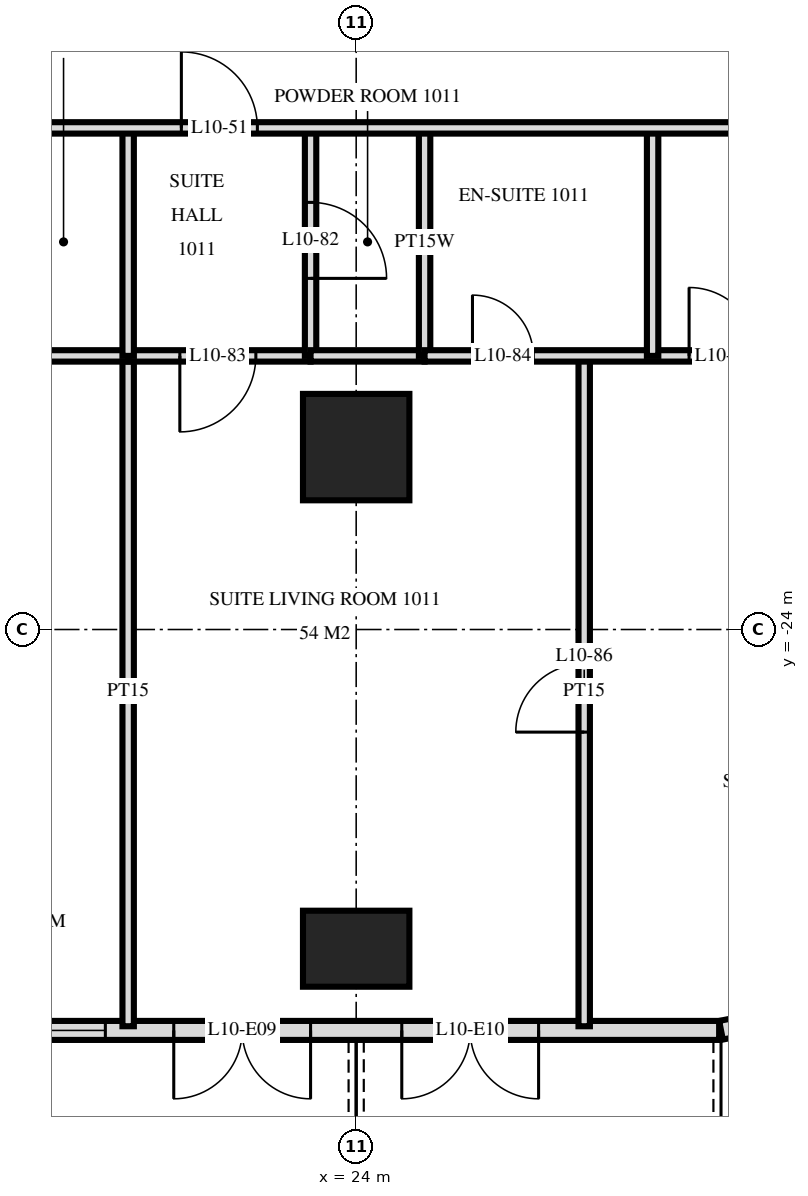
"""IFC4 building model, lengths in metres.
Left out: names, types, materials, properties, quantities, classifications, styles, units other than length and angle.
Written with IfcOpenShell. Run it as: python <this file> out.ifc"""

import sys

from ifc_helpers import new_model, si_unit, direction, frame, frame_2d, origin, origin_2d, place, context, subcontext, project, spatial, rectangle, extrude, element, fill, save


model = new_model("IFC4")
c1 = context("Model", 3, precision=1e-05, world=origin(), true_north=direction((0.0, 1.0)))
c2 = subcontext(c1, "Body", "Model", "MODEL_VIEW")
j1 = project(units=[si_unit("LENGTHUNIT", "METRE"), si_unit("PLANEANGLEUNIT", "RADIAN")], contexts=[c1])
p1 = place(None, origin())
s1 = spatial("IfcSite", under=j1, at=p1, CompositionType="ELEMENT")
p2 = place(p1, origin())
s2 = spatial("IfcBuilding", under=s1, at=p2, CompositionType="ELEMENT")
p3 = place(p2, frame((0.0, 0.0, 45.6)))
s3 = spatial("IfcBuildingStorey", under=s2, at=p3, CompositionType="ELEMENT", Elevation=45.6)
p4 = place(p3, frame((24.0, -28.2, 0.0), z_axis=(0.0, 0.0, 1.0), x_axis=(1.0, 0.0, 0.0)))
e1 = element("IfcColumn", 1, at=p4, inside=s3, PredefinedType="COLUMN", context=c2, shape_type="SweptSolid", body=[
    extrude(rectangle(XDim=1.4, YDim=1.0, at=origin_2d()), origin(), (0.0, 0.0, 1.0), 3.6),
])
p5 = place(p3, frame((24.0, -21.6, 0.0), z_axis=(0.0, 0.0, 1.0), x_axis=(1.0, 0.0, 0.0)))
e2 = element("IfcColumn", 2, at=p5, inside=s3, PredefinedType="COLUMN", context=c2, shape_type="SweptSolid", body=[
    extrude(rectangle(XDim=1.4, YDim=1.4, at=origin_2d()), origin(), (0.0, 0.0, 1.0), 3.6),
])
p6 = place(p3, frame((-28.775, -29.275, 0.0), z_axis=(0.0, 0.0, 1.0), x_axis=(1.0, 0.0, 0.0)))
e3 = element("IfcWall", 3, at=p6, inside=s3, PredefinedType="SOLIDWALL", context=c2, shape_type="SweptSolid", body=[
    extrude(rectangle(XDim=57.551, YDim=0.25, at=frame_2d((28.775, 0.0))), origin(), (0.0, 0.0, 1.0), 3.32),
])
p7 = place(p6, frame((0.575, 0.0, 0.0)))
e4 = element("IfcOpeningElement", 4, at=p7, cuts=e3, PredefinedType="OPENING", context=c2, shape_type="SweptSolid", body=[
    extrude(rectangle(XDim=1.8, YDim=2.4, at=frame_2d((0.9, 1.2))), frame((0.0, 0.135, 0.0), z_axis=(0.0, -1.0, 0.0), x_axis=(1.0, 0.0, 0.0)), (0.0, 0.0, 1.0), 0.27),
])
p8 = place(p6, frame((5.375, 0.0, 0.0)))
e5 = element("IfcOpeningElement", 5, at=p8, cuts=e3, PredefinedType="OPENING", context=c2, shape_type="SweptSolid", body=[
    extrude(rectangle(XDim=1.8, YDim=2.4, at=frame_2d((0.9, 1.2))), frame((0.0, 0.135, 0.0), z_axis=(0.0, -1.0, 0.0), x_axis=(1.0, 0.0, 0.0)), (0.0, 0.0, 1.0), 0.27),
])
p9 = place(p6, frame((8.075, 0.0, 0.3)))
e6 = element("IfcOpeningElement", 6, at=p9, cuts=e3, PredefinedType="OPENING", context=c2, shape_type="SweptSolid", body=[
    extrude(rectangle(XDim=2.4, YDim=2.1, at=frame_2d((1.2, 1.05))), frame((0.0, 0.135, 0.0), z_axis=(0.0, -1.0, 0.0), x_axis=(1.0, 0.0, 0.0)), (0.0, 0.0, 1.0), 0.27),
])
p10 = place(p6, frame((12.875, 0.0, 0.0)))
e7 = element("IfcOpeningElement", 7, at=p10, cuts=e3, PredefinedType="OPENING", context=c2, shape_type="SweptSolid", body=[
    extrude(rectangle(XDim=1.8, YDim=2.4, at=frame_2d((0.9, 1.2))), frame((0.0, 0.135, 0.0), z_axis=(0.0, -1.0, 0.0), x_axis=(1.0, 0.0, 0.0)), (0.0, 0.0, 1.0), 0.27),
])
p11 = place(p6, frame((17.375, 0.0, 0.0)))
e8 = element("IfcOpeningElement", 8, at=p11, cuts=e3, PredefinedType="OPENING", context=c2, shape_type="SweptSolid", body=[
    extrude(rectangle(XDim=1.8, YDim=2.4, at=frame_2d((0.9, 1.2))), frame((0.0, 0.135, 0.0), z_axis=(0.0, -1.0, 0.0), x_axis=(1.0, 0.0, 0.0)), (0.0, 0.0, 1.0), 0.27),
])
p12 = place(p6, frame((20.075, 0.0, 0.3)))
e9 = element("IfcOpeningElement", 9, at=p12, cuts=e3, PredefinedType="OPENING", context=c2, shape_type="SweptSolid", body=[
    extrude(rectangle(XDim=2.4, YDim=2.1, at=frame_2d((1.2, 1.05))), frame((0.0, 0.135, 0.0), z_axis=(0.0, -1.0, 0.0), x_axis=(1.0, 0.0, 0.0)), (0.0, 0.0, 1.0), 0.27),
])
p13 = place(p6, frame((23.075, 0.0, 0.3)))
e10 = element("IfcOpeningElement", 10, at=p13, cuts=e3, PredefinedType="OPENING", context=c2, shape_type="SweptSolid", body=[
    extrude(rectangle(XDim=2.4, YDim=2.1, at=frame_2d((1.2, 1.05))), frame((0.0, 0.135, 0.0), z_axis=(0.0, -1.0, 0.0), x_axis=(1.0, 0.0, 0.0)), (0.0, 0.0, 1.0), 0.27),
])
p14 = place(p6, frame((26.375, 0.0, 0.0)))
e11 = element("IfcOpeningElement", 11, at=p14, cuts=e3, PredefinedType="OPENING", context=c2, shape_type="SweptSolid", body=[
    extrude(rectangle(XDim=1.8, YDim=2.4, at=frame_2d((0.9, 1.2))), frame((0.0, 0.135, 0.0), z_axis=(0.0, -1.0, 0.0), x_axis=(1.0, 0.0, 0.0)), (0.0, 0.0, 1.0), 0.27),
])
p15 = place(p6, frame((29.075, 0.0, 0.3)))
e12 = element("IfcOpeningElement", 12, at=p15, cuts=e3, PredefinedType="OPENING", context=c2, shape_type="SweptSolid", body=[
    extrude(rectangle(XDim=2.4, YDim=2.1, at=frame_2d((1.2, 1.05))), frame((0.0, 0.135, 0.0), z_axis=(0.0, -1.0, 0.0), x_axis=(1.0, 0.0, 0.0)), (0.0, 0.0, 1.0), 0.27),
])
p16 = place(p6, frame((32.375, 0.0, 0.0)))
e13 = element("IfcOpeningElement", 13, at=p16, cuts=e3, PredefinedType="OPENING", context=c2, shape_type="SweptSolid", body=[
    extrude(rectangle(XDim=1.8, YDim=2.4, at=frame_2d((0.9, 1.2))), frame((0.0, 0.135, 0.0), z_axis=(0.0, -1.0, 0.0), x_axis=(1.0, 0.0, 0.0)), (0.0, 0.0, 1.0), 0.27),
])
p17 = place(p6, frame((35.375, 0.0, 0.0)))
e14 = element("IfcOpeningElement", 14, at=p17, cuts=e3, PredefinedType="OPENING", context=c2, shape_type="SweptSolid", body=[
    extrude(rectangle(XDim=1.8, YDim=2.4, at=frame_2d((0.9, 1.2))), frame((0.0, 0.135, 0.0), z_axis=(0.0, -1.0, 0.0), x_axis=(1.0, 0.0, 0.0)), (0.0, 0.0, 1.0), 0.27),
])
p18 = place(p6, frame((38.075, 0.0, 0.3)))
e15 = element("IfcOpeningElement", 15, at=p18, cuts=e3, PredefinedType="OPENING", context=c2, shape_type="SweptSolid", body=[
    extrude(rectangle(XDim=2.4, YDim=2.1, at=frame_2d((1.2, 1.05))), frame((0.0, 0.135, 0.0), z_axis=(0.0, -1.0, 0.0), x_axis=(1.0, 0.0, 0.0)), (0.0, 0.0, 1.0), 0.27),
])
p19 = place(p6, frame((41.075, 0.0, 0.3)))
e16 = element("IfcOpeningElement", 16, at=p19, cuts=e3, PredefinedType="OPENING", context=c2, shape_type="SweptSolid", body=[
    extrude(rectangle(XDim=2.4, YDim=2.1, at=frame_2d((1.2, 1.05))), frame((0.0, 0.135, 0.0), z_axis=(0.0, -1.0, 0.0), x_axis=(1.0, 0.0, 0.0)), (0.0, 0.0, 1.0), 0.27),
])
p20 = place(p6, frame((44.375, 0.0, 0.0)))
e17 = element("IfcOpeningElement", 17, at=p20, cuts=e3, PredefinedType="OPENING", context=c2, shape_type="SweptSolid", body=[
    extrude(rectangle(XDim=1.8, YDim=2.4, at=frame_2d((0.9, 1.2))), frame((0.0, 0.135, 0.0), z_axis=(0.0, -1.0, 0.0), x_axis=(1.0, 0.0, 0.0)), (0.0, 0.0, 1.0), 0.27),
])
p21 = place(p6, frame((47.075, 0.0, 0.3)))
e18 = element("IfcOpeningElement", 18, at=p21, cuts=e3, PredefinedType="OPENING", context=c2, shape_type="SweptSolid", body=[
    extrude(rectangle(XDim=2.4, YDim=2.1, at=frame_2d((1.2, 1.05))), frame((0.0, 0.135, 0.0), z_axis=(0.0, -1.0, 0.0), x_axis=(1.0, 0.0, 0.0)), (0.0, 0.0, 1.0), 0.27),
])
p22 = place(p6, frame((50.375, 0.0, 0.0)))
e19 = element("IfcOpeningElement", 19, at=p22, cuts=e3, PredefinedType="OPENING", context=c2, shape_type="SweptSolid", body=[
    extrude(rectangle(XDim=1.8, YDim=2.4, at=frame_2d((0.9, 1.2))), frame((0.0, 0.135, 0.0), z_axis=(0.0, -1.0, 0.0), x_axis=(1.0, 0.0, 0.0)), (0.0, 0.0, 1.0), 0.27),
])
p23 = place(p6, frame((53.375, 0.0, 0.0)))
e20 = element("IfcOpeningElement", 20, at=p23, cuts=e3, PredefinedType="OPENING", context=c2, shape_type="SweptSolid", body=[
    extrude(rectangle(XDim=1.8, YDim=2.4, at=frame_2d((0.9, 1.2))), frame((0.0, 0.135, 0.0), z_axis=(0.0, -1.0, 0.0), x_axis=(1.0, 0.0, 0.0)), (0.0, 0.0, 1.0), 0.27),
])
p24 = place(p3, frame((28.8, -29.273, 0.0), z_axis=(0.0, 0.0, 1.0), x_axis=(0.980775640221, 0.19513878023, 0.0)))
e21 = element("IfcWall", 21, at=p24, inside=s3, PredefinedType="SOLIDWALL", context=c2, shape_type="SweptSolid", body=[
    extrude(rectangle(XDim=1.681, YDim=0.25, at=frame_2d((0.841, 0.0))), origin(), (0.0, 0.0, 1.0), 3.32),
])
p25 = place(p3, frame((27.9, -20.4, 0.0), z_axis=(0.0, 0.0, 1.0), x_axis=(0.0, 1.0, 0.0)))
e22 = element("IfcWall", 22, at=p25, inside=s3, PredefinedType="PARTITIONING", context=c2, shape_type="SweptSolid", body=[
    extrude(rectangle(XDim=3.0, YDim=0.15, at=frame_2d((1.5, 0.0))), origin(), (0.0, 0.0, 1.0), 3.32),
])
p26 = place(p3, frame((27.0, -29.22, 0.0), z_axis=(0.0, 0.0, 1.0), x_axis=(0.0, 1.0, 0.0)))
e23 = element("IfcWall", 23, at=p26, inside=s3, PredefinedType="PARTITIONING", context=c2, shape_type="SweptSolid", body=[
    extrude(rectangle(XDim=8.82, YDim=0.15, at=frame_2d((4.41, 0.0))), origin(), (0.0, 0.0, 1.0), 3.32),
])
p27 = place(p26, frame((3.87, 0.0, 0.0)))
e24 = element("IfcOpeningElement", 24, at=p27, cuts=e23, PredefinedType="OPENING", context=c2, shape_type="SweptSolid", body=[
    extrude(rectangle(XDim=0.9, YDim=2.1, at=frame_2d((0.45, 1.05))), frame((0.0, 0.085, 0.0), z_axis=(0.0, -1.0, 0.0), x_axis=(1.0, 0.0, 0.0)), (0.0, 0.0, 1.0), 0.17),
])
p28 = place(p3, frame((24.9, -20.4, 0.0), z_axis=(0.0, 0.0, 1.0), x_axis=(0.0, 1.0, 0.0)))
e25 = element("IfcWall", 25, at=p28, inside=s3, PredefinedType="PLUMBINGWALL", context=c2, shape_type="SweptSolid", body=[
    extrude(rectangle(XDim=3.0, YDim=0.15, at=frame_2d((1.5, 0.0))), origin(), (0.0, 0.0, 1.0), 3.32),
])
p29 = place(p3, frame((23.4, -20.4, 0.0), z_axis=(0.0, 0.0, 1.0), x_axis=(0.0, 1.0, 0.0)))
e26 = element("IfcWall", 26, at=p29, inside=s3, PredefinedType="PARTITIONING", context=c2, shape_type="SweptSolid", body=[
    extrude(rectangle(XDim=3.0, YDim=0.15, at=frame_2d((1.5, 0.0))), origin(), (0.0, 0.0, 1.0), 3.32),
])
p30 = place(p29, frame((1.02, 0.0, 0.0)))
e27 = element("IfcOpeningElement", 27, at=p30, cuts=e26, PredefinedType="OPENING", context=c2, shape_type="SweptSolid", body=[
    extrude(rectangle(XDim=1.0, YDim=2.1, at=frame_2d((0.5, 1.05))), frame((0.0, 0.085, 0.0), z_axis=(0.0, -1.0, 0.0), x_axis=(1.0, 0.0, 0.0)), (0.0, 0.0, 1.0), 0.17),
])
p31 = place(p3, frame((21.0, -20.4, 0.0), z_axis=(0.0, 0.0, 1.0), x_axis=(0.0, 1.0, 0.0)))
e28 = element("IfcWall", 28, at=p31, inside=s3, PredefinedType="PARTITIONING", context=c2, shape_type="SweptSolid", body=[
    extrude(rectangle(XDim=3.0, YDim=0.15, at=frame_2d((1.5, 0.0))), origin(), (0.0, 0.0, 1.0), 3.32),
])
p32 = place(p3, frame((21.0, -29.22, 0.0), z_axis=(0.0, 0.0, 1.0), x_axis=(0.0, 1.0, 0.0)))
e29 = element("IfcWall", 29, at=p32, inside=s3, PredefinedType="PARTITIONING", context=c2, shape_type="SweptSolid", body=[
    extrude(rectangle(XDim=8.82, YDim=0.15, at=frame_2d((4.41, 0.0))), origin(), (0.0, 0.0, 1.0), 3.32),
])
p33 = place(p3, frame((21.0, -20.4, 0.0), z_axis=(0.0, 0.0, 1.0), x_axis=(1.0, 0.0, 0.0)))
e30 = element("IfcWall", 30, at=p33, inside=s3, PredefinedType="PARTITIONING", context=c2, shape_type="SweptSolid", body=[
    extrude(rectangle(XDim=2.4, YDim=0.15, at=frame_2d((1.2, 0.0))), origin(), (0.0, 0.0, 1.0), 3.32),
])
p34 = place(p33, frame((0.68, 0.0, 0.0)))
e31 = element("IfcOpeningElement", 31, at=p34, cuts=e30, PredefinedType="OPENING", context=c2, shape_type="SweptSolid", body=[
    extrude(rectangle(XDim=1.0, YDim=2.1, at=frame_2d((0.5, 1.05))), frame((0.0, 0.085, 0.0), z_axis=(0.0, -1.0, 0.0), x_axis=(1.0, 0.0, 0.0)), (0.0, 0.0, 1.0), 0.17),
])
p35 = place(p3, frame((19.3, -20.4, 0.0), z_axis=(0.0, 0.0, 1.0), x_axis=(1.0, 0.0, 0.0)))
e32 = element("IfcWall", 32, at=p35, inside=s3, PredefinedType="PARTITIONING", context=c2, shape_type="SweptSolid", body=[
    extrude(rectangle(XDim=1.7, YDim=0.15, at=frame_2d((0.85, 0.0))), origin(), (0.0, 0.0, 1.0), 3.32),
])
p36 = place(p3, frame((24.9, -20.4, 0.0), z_axis=(0.0, 0.0, 1.0), x_axis=(1.0, 0.0, 0.0)))
e33 = element("IfcWall", 33, at=p36, inside=s3, PredefinedType="PARTITIONING", context=c2, shape_type="SweptSolid", body=[
    extrude(rectangle(XDim=8.22, YDim=0.15, at=frame_2d((4.11, 0.0))), origin(), (0.0, 0.0, 1.0), 3.32),
])
p37 = place(p36, frame((0.63, 0.0, 0.0)))
e34 = element("IfcOpeningElement", 34, at=p37, cuts=e33, PredefinedType="OPENING", context=c2, shape_type="SweptSolid", body=[
    extrude(rectangle(XDim=0.8, YDim=2.1, at=frame_2d((0.4, 1.05))), frame((0.0, 0.085, 0.0), z_axis=(0.0, -1.0, 0.0), x_axis=(1.0, 0.0, 0.0)), (0.0, 0.0, 1.0), 0.17),
])
p38 = place(p36, frame((3.48, 0.0, 0.0)))
e35 = element("IfcOpeningElement", 35, at=p38, cuts=e33, PredefinedType="OPENING", context=c2, shape_type="SweptSolid", body=[
    extrude(rectangle(XDim=0.9, YDim=2.1, at=frame_2d((0.45, 1.05))), frame((0.0, 0.085, 0.0), z_axis=(0.0, -1.0, 0.0), x_axis=(1.0, 0.0, 0.0)), (0.0, 0.0, 1.0), 0.17),
])
p39 = place(p3, frame((23.4, -20.4, 0.0), z_axis=(0.0, 0.0, 1.0), x_axis=(1.0, 0.0, 0.0)))
e36 = element("IfcWall", 36, at=p39, inside=s3, PredefinedType="PLUMBINGWALL", context=c2, shape_type="SweptSolid", body=[
    extrude(rectangle(XDim=1.5, YDim=0.15, at=frame_2d((0.75, 0.0))), origin(), (0.0, 0.0, 1.0), 3.32),
])
p40 = place(p3, frame((-33.12, -17.4, 0.0), z_axis=(0.0, 0.0, 1.0), x_axis=(1.0, 0.0, 0.0)))
e37 = element("IfcWall", 37, at=p40, inside=s3, PredefinedType="PARTITIONING", context=c2, shape_type="SweptSolid", body=[
    extrude(rectangle(XDim=66.24, YDim=0.15, at=frame_2d((33.12, 0.0))), origin(), (0.0, 0.0, 1.0), 3.32),
])
p41 = place(p40, frame((9.27, 0.0, 0.0)))
e38 = element("IfcOpeningElement", 38, at=p41, cuts=e37, PredefinedType="OPENING", context=c2, shape_type="SweptSolid", body=[
    extrude(rectangle(XDim=1.0, YDim=2.1, at=frame_2d((0.5, 1.05))), frame((0.0, 0.085, 0.0), z_axis=(0.0, -1.0, 0.0), x_axis=(1.0, 0.0, 0.0)), (0.0, 0.0, 1.0), 0.17),
])
p42 = place(p40, frame((13.97, 0.0, 0.0)))
e39 = element("IfcOpeningElement", 39, at=p42, cuts=e37, PredefinedType="OPENING", context=c2, shape_type="SweptSolid", body=[
    extrude(rectangle(XDim=1.0, YDim=2.1, at=frame_2d((0.5, 1.05))), frame((0.0, 0.085, 0.0), z_axis=(0.0, -1.0, 0.0), x_axis=(1.0, 0.0, 0.0)), (0.0, 0.0, 1.0), 0.17),
])
p43 = place(p40, frame((17.62, 0.0, 0.0)))
e40 = element("IfcOpeningElement", 40, at=p43, cuts=e37, PredefinedType="OPENING", context=c2, shape_type="SweptSolid", body=[
    extrude(rectangle(XDim=1.0, YDim=2.1, at=frame_2d((0.5, 1.05))), frame((0.0, 0.085, 0.0), z_axis=(0.0, -1.0, 0.0), x_axis=(1.0, 0.0, 0.0)), (0.0, 0.0, 1.0), 0.17),
])
p44 = place(p40, frame((21.27, 0.0, 0.0)))
e41 = element("IfcOpeningElement", 41, at=p44, cuts=e37, PredefinedType="OPENING", context=c2, shape_type="SweptSolid", body=[
    extrude(rectangle(XDim=1.0, YDim=2.1, at=frame_2d((0.5, 1.05))), frame((0.0, 0.085, 0.0), z_axis=(0.0, -1.0, 0.0), x_axis=(1.0, 0.0, 0.0)), (0.0, 0.0, 1.0), 0.17),
])
p45 = place(p40, frame((25.97, 0.0, 0.0)))
e42 = element("IfcOpeningElement", 42, at=p45, cuts=e37, PredefinedType="OPENING", context=c2, shape_type="SweptSolid", body=[
    extrude(rectangle(XDim=1.0, YDim=2.1, at=frame_2d((0.5, 1.05))), frame((0.0, 0.085, 0.0), z_axis=(0.0, -1.0, 0.0), x_axis=(1.0, 0.0, 0.0)), (0.0, 0.0, 1.0), 0.17),
])
p46 = place(p40, frame((35.62, 0.0, 0.0)))
e43 = element("IfcOpeningElement", 43, at=p46, cuts=e37, PredefinedType="OPENING", context=c2, shape_type="SweptSolid", body=[
    extrude(rectangle(XDim=1.0, YDim=2.1, at=frame_2d((0.5, 1.05))), frame((0.0, 0.085, 0.0), z_axis=(0.0, -1.0, 0.0), x_axis=(1.0, 0.0, 0.0)), (0.0, 0.0, 1.0), 0.17),
])
p47 = place(p40, frame((40.97, 0.0, 0.0)))
e44 = element("IfcOpeningElement", 44, at=p47, cuts=e37, PredefinedType="OPENING", context=c2, shape_type="SweptSolid", body=[
    extrude(rectangle(XDim=1.0, YDim=2.1, at=frame_2d((0.5, 1.05))), frame((0.0, 0.085, 0.0), z_axis=(0.0, -1.0, 0.0), x_axis=(1.0, 0.0, 0.0)), (0.0, 0.0, 1.0), 0.17),
])
p48 = place(p40, frame((42.27, 0.0, 0.0)))
e45 = element("IfcOpeningElement", 45, at=p48, cuts=e37, PredefinedType="OPENING", context=c2, shape_type="SweptSolid", body=[
    extrude(rectangle(XDim=1.0, YDim=2.1, at=frame_2d((0.5, 1.05))), frame((0.0, 0.085, 0.0), z_axis=(0.0, -1.0, 0.0), x_axis=(1.0, 0.0, 0.0)), (0.0, 0.0, 1.0), 0.17),
])
p49 = place(p40, frame((49.72, 0.0, 0.0)))
e46 = element("IfcOpeningElement", 46, at=p49, cuts=e37, PredefinedType="OPENING", context=c2, shape_type="SweptSolid", body=[
    extrude(rectangle(XDim=1.0, YDim=2.1, at=frame_2d((0.5, 1.05))), frame((0.0, 0.085, 0.0), z_axis=(0.0, -1.0, 0.0), x_axis=(1.0, 0.0, 0.0)), (0.0, 0.0, 1.0), 0.17),
])
p50 = place(p40, frame((51.27, 0.0, 0.0)))
e47 = element("IfcOpeningElement", 47, at=p50, cuts=e37, PredefinedType="OPENING", context=c2, shape_type="SweptSolid", body=[
    extrude(rectangle(XDim=1.0, YDim=2.1, at=frame_2d((0.5, 1.05))), frame((0.0, 0.085, 0.0), z_axis=(0.0, -1.0, 0.0), x_axis=(1.0, 0.0, 0.0)), (0.0, 0.0, 1.0), 0.17),
])
p51 = place(p40, frame((4.42, 0.0, 0.0)))
e48 = element("IfcOpeningElement", 48, at=p51, cuts=e37, PredefinedType="OPENING", context=c2, shape_type="SweptSolid", body=[
    extrude(rectangle(XDim=1.0, YDim=2.1, at=frame_2d((0.5, 1.05))), frame((0.0, 0.085, 0.0), z_axis=(0.0, -1.0, 0.0), x_axis=(1.0, 0.0, 0.0)), (0.0, 0.0, 1.0), 0.17),
])
p52 = place(p40, frame((54.82, 0.0, 0.0)))
e49 = element("IfcOpeningElement", 49, at=p52, cuts=e37, PredefinedType="OPENING", context=c2, shape_type="SweptSolid", body=[
    extrude(rectangle(XDim=1.0, YDim=2.1, at=frame_2d((0.5, 1.05))), frame((0.0, 0.085, 0.0), z_axis=(0.0, -1.0, 0.0), x_axis=(1.0, 0.0, 0.0)), (0.0, 0.0, 1.0), 0.17),
])
p53 = place(p21, origin())
e50 = element("IfcWindow", 50, at=p53, inside=s3, PartitioningType="SINGLE_PANEL", PredefinedType="WINDOW", context=c2, shape_type="SweptSolid", body=[
    extrude(rectangle(XDim=2.4, YDim=2.1, at=frame_2d((1.2, 1.05))), frame((0.0, 0.03, 0.0), z_axis=(0.0, -1.0, 0.0), x_axis=(1.0, 0.0, 0.0)), (0.0, 0.0, 1.0), 0.06),
])
fill(e18, e50)
p54 = place(p22, frame((0.9, 0.0, 0.0), z_axis=(0.0, 0.0, 1.0), x_axis=(-1.0, 0.0, 0.0)))
e51 = element("IfcDoor", 51, at=p54, inside=s3, OperationType="DOUBLE_DOOR_SINGLE_SWING", PredefinedType="DOOR", context=c2, shape_type="SweptSolid", body=[
    extrude(rectangle(XDim=1.8, YDim=2.4, at=frame_2d((0.0, 1.2))), frame((0.0, -0.025, 0.0), z_axis=(0.0, 1.0, 0.0), x_axis=(-1.0, 0.0, 0.0)), (0.0, 0.0, 1.0), 0.05),
])
fill(e19, e51)
p55 = place(p23, frame((0.9, 0.0, 0.0), z_axis=(0.0, 0.0, 1.0), x_axis=(-1.0, 0.0, 0.0)))
e52 = element("IfcDoor", 52, at=p55, inside=s3, OperationType="DOUBLE_DOOR_SINGLE_SWING", PredefinedType="DOOR", context=c2, shape_type="SweptSolid", body=[
    extrude(rectangle(XDim=1.8, YDim=2.4, at=frame_2d((0.0, 1.2))), frame((0.0, -0.025, 0.0), z_axis=(0.0, 1.0, 0.0), x_axis=(-1.0, 0.0, 0.0)), (0.0, 0.0, 1.0), 0.05),
])
fill(e20, e52)
p56 = place(p52, origin())
e53 = element("IfcDoor", 53, at=p56, inside=s3, OperationType="SINGLE_SWING_RIGHT", PredefinedType="DOOR", context=c2, shape_type="SweptSolid", body=[
    extrude(rectangle(XDim=1.0, YDim=2.1, at=frame_2d((0.5, 1.05))), frame((0.0, 0.025, 0.0), z_axis=(0.0, -1.0, 0.0), x_axis=(1.0, 0.0, 0.0)), (0.0, 0.0, 1.0), 0.05),
])
fill(e49, e53)
p57 = place(p30, frame((0.5, 0.0, 0.0), z_axis=(0.0, 0.0, 1.0), x_axis=(-1.0, 0.0, 0.0)))
e54 = element("IfcDoor", 54, at=p57, inside=s3, OperationType="SINGLE_SWING_LEFT", PredefinedType="DOOR", context=c2, shape_type="SweptSolid", body=[
    extrude(rectangle(XDim=1.0, YDim=2.1, at=frame_2d((0.0, 1.05))), frame((0.0, -0.025, 0.0), z_axis=(0.0, 1.0, 0.0), x_axis=(-1.0, 0.0, 0.0)), (0.0, 0.0, 1.0), 0.05),
])
fill(e27, e54)
p58 = place(p34, frame((0.5, 0.0, 0.0), z_axis=(0.0, 0.0, 1.0), x_axis=(-1.0, 0.0, 0.0)))
e55 = element("IfcDoor", 55, at=p58, inside=s3, OperationType="SINGLE_SWING_LEFT", PredefinedType="DOOR", context=c2, shape_type="SweptSolid", body=[
    extrude(rectangle(XDim=1.0, YDim=2.1, at=frame_2d((0.0, 1.05))), frame((0.0, -0.025, 0.0), z_axis=(0.0, 1.0, 0.0), x_axis=(-1.0, 0.0, 0.0)), (0.0, 0.0, 1.0), 0.05),
])
fill(e31, e55)
p59 = place(p37, origin())
e56 = element("IfcDoor", 56, at=p59, inside=s3, OperationType="SINGLE_SWING_RIGHT", PredefinedType="DOOR", context=c2, shape_type="SweptSolid", body=[
    extrude(rectangle(XDim=0.8, YDim=2.1, at=frame_2d((0.4, 1.05))), frame((0.0, 0.025, 0.0), z_axis=(0.0, -1.0, 0.0), x_axis=(1.0, 0.0, 0.0)), (0.0, 0.0, 1.0), 0.05),
])
fill(e34, e56)
p60 = place(p38, origin())
e57 = element("IfcDoor", 57, at=p60, inside=s3, OperationType="SINGLE_SWING_RIGHT", PredefinedType="DOOR", context=c2, shape_type="SweptSolid", body=[
    extrude(rectangle(XDim=0.9, YDim=2.1, at=frame_2d((0.45, 1.05))), frame((0.0, 0.025, 0.0), z_axis=(0.0, -1.0, 0.0), x_axis=(1.0, 0.0, 0.0)), (0.0, 0.0, 1.0), 0.05),
])
fill(e35, e57)
p61 = place(p27, origin())
e58 = element("IfcDoor", 58, at=p61, inside=s3, OperationType="SINGLE_SWING_RIGHT", PredefinedType="DOOR", context=c2, shape_type="SweptSolid", body=[
    extrude(rectangle(XDim=0.9, YDim=2.1, at=frame_2d((0.45, 1.05))), frame((0.0, 0.025, 0.0), z_axis=(0.0, -1.0, 0.0), x_axis=(1.0, 0.0, 0.0)), (0.0, 0.0, 1.0), 0.05),
])
fill(e24, e58)
save(model, sys.argv[1])
